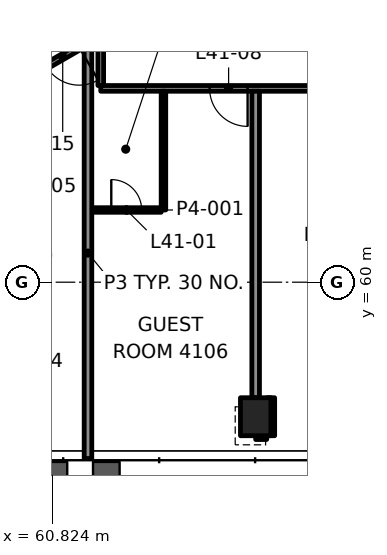
"""IFC4 building model, lengths in metres.
Left out: names, types, materials, properties, quantities, classifications, styles, units other than length and angle.
Written with IfcOpenShell. Run it as: python <this file> out.ifc"""

import sys

from ifc_helpers import new_model, si_unit, direction, frame, frame_2d, origin, origin_2d, place, context, subcontext, project, spatial, rectangle, hollow_rectangle, extrude, element, fill, save


model = new_model("IFC4")
c1 = context("Model", 3, precision=1e-05, world=origin(), true_north=direction((0.0, 1.0)))
c2 = subcontext(c1, "Body", "Model", "MODEL_VIEW")
j1 = project(units=[si_unit("LENGTHUNIT", "METRE"), si_unit("PLANEANGLEUNIT", "RADIAN")], contexts=[c1])
p1 = place(None, origin())
s1 = spatial("IfcSite", under=j1, at=p1, CompositionType="ELEMENT")
p2 = place(p1, origin())
s2 = spatial("IfcBuilding", under=s1, at=p2, CompositionType="ELEMENT")
p3 = place(p2, frame((0.0, 0.0, 179.2)))
s3 = spatial("IfcBuildingStorey", under=s2, at=p3, CompositionType="ELEMENT", Elevation=179.2)
p4 = place(p3, frame((66.176, 56.46, -0.0), z_axis=(0.0, 0.0, 1.0), x_axis=(1.0, 0.0, 0.0)))
e1 = element("IfcColumn", 1, at=p4, inside=s3, PredefinedType="COLUMN", context=c2, shape_type="SweptSolid", body=[
    extrude(hollow_rectangle(XDim=0.8, YDim=1.0, WallThickness=0.05, at=origin_2d()), origin(), (0.0, 0.0, 1.0), 3.9),
])
p5 = place(p3, frame((66.176, 55.96, 0.0), z_axis=(0.0, 0.0, 1.0), x_axis=(1.0, 0.0, 0.0)))
e2 = element("IfcWall", 2, at=p5, inside=s3, PredefinedType="PARTITIONING", context=c2, shape_type="SweptSolid", body=[
    extrude(rectangle(XDim=0.29, YDim=0.2, at=frame_2d((0.145, 0.0))), origin(), (0.0, 0.0, 1.0), 3.1),
])
p6 = place(p3, frame((61.864, 61.9, 0.0), z_axis=(0.0, 0.0, 1.0), x_axis=(1.0, 0.0, 0.0)))
e3 = element("IfcWall", 3, at=p6, inside=s3, PredefinedType="PARTITIONING", context=c2, shape_type="SweptSolid", body=[
    extrude(rectangle(XDim=1.825, YDim=0.12, at=frame_2d((0.913, 0.0))), origin(), (0.0, 0.0, 1.0), 3.1),
])
p7 = place(p6, frame((0.513, 0.0, 0.0)))
e4 = element("IfcOpeningElement", 4, at=p7, cuts=e3, PredefinedType="OPENING", context=c2, shape_type="SweptSolid", body=[
    extrude(rectangle(XDim=0.8, YDim=2.1, at=frame_2d((0.4, 1.05))), frame((0.0, 0.07, 0.0), z_axis=(0.0, -1.0, 0.0), x_axis=(1.0, 0.0, 0.0)), (0.0, 0.0, 1.0), 0.14),
])
p8 = place(p3, frame((87.9, 65.1, 0.0), z_axis=(0.0, 0.0, 1.0), x_axis=(-1.0, 0.0, 0.0)))
e5 = element("IfcWall", 5, at=p8, inside=s3, PredefinedType="PARTITIONING", context=c2, shape_type="SweptSolid", body=[
    extrude(rectangle(XDim=25.8, YDim=0.15, at=frame_2d((12.9, 0.0))), origin(), (0.0, 0.0, 1.0), 3.1),
])
p9 = place(p8, frame((2.264, 0.0, 0.0)))
e6 = element("IfcOpeningElement", 6, at=p9, cuts=e5, PredefinedType="OPENING", context=c2, shape_type="SweptSolid", body=[
    extrude(rectangle(XDim=1.0, YDim=2.1, at=frame_2d((0.5, 1.05))), frame((0.0, 0.085, 0.0), z_axis=(0.0, -1.0, 0.0), x_axis=(1.0, 0.0, 0.0)), (0.0, 0.0, 1.0), 0.17),
])
p10 = place(p8, frame((10.244, 0.0, 0.0)))
e7 = element("IfcOpeningElement", 7, at=p10, cuts=e5, PredefinedType="OPENING", context=c2, shape_type="SweptSolid", body=[
    extrude(rectangle(XDim=0.9, YDim=2.1, at=frame_2d((0.45, 1.05))), frame((0.0, 0.085, 0.0), z_axis=(0.0, -1.0, 0.0), x_axis=(1.0, 0.0, 0.0)), (0.0, 0.0, 1.0), 0.17),
])
p11 = place(p8, frame((18.135, 0.0, 0.0)))
e8 = element("IfcOpeningElement", 8, at=p11, cuts=e5, PredefinedType="OPENING", context=c2, shape_type="SweptSolid", body=[
    extrude(rectangle(XDim=1.0, YDim=2.1, at=frame_2d((0.5, 1.05))), frame((0.0, 0.085, 0.0), z_axis=(0.0, -1.0, 0.0), x_axis=(1.0, 0.0, 0.0)), (0.0, 0.0, 1.0), 0.17),
])
p12 = place(p8, frame((21.936, 0.0, 0.0)))
e9 = element("IfcOpeningElement", 9, at=p12, cuts=e5, PredefinedType="OPENING", context=c2, shape_type="SweptSolid", body=[
    extrude(rectangle(XDim=1.0, YDim=2.1, at=frame_2d((0.5, 1.05))), frame((0.0, 0.085, 0.0), z_axis=(0.0, -1.0, 0.0), x_axis=(1.0, 0.0, 0.0)), (0.0, 0.0, 1.0), 0.17),
])
p13 = place(p3, frame((62.1, 66.513, 0.0), z_axis=(0.0, 0.0, 1.0), x_axis=(-0.866025334814, -0.500000119461, 0.0)))
e10 = element("IfcWall", 10, at=p13, inside=s3, PredefinedType="PARTITIONING", context=c2, shape_type="SweptSolid", body=[
    extrude(rectangle(XDim=14.03, YDim=0.15, at=frame_2d((7.015, 0.0))), origin(), (0.0, 0.0, 1.0), 2.947),
])
p14 = place(p13, frame((0.656, 0.0, 0.0)))
e11 = element("IfcOpeningElement", 11, at=p14, cuts=e10, PredefinedType="OPENING", context=c2, shape_type="SweptSolid", body=[
    extrude(rectangle(XDim=1.0, YDim=2.1, at=frame_2d((0.5, 1.05))), frame((0.0, 0.085, 0.0), z_axis=(0.0, -1.0, 0.0), x_axis=(1.0, 0.0, 0.0)), (0.0, 0.0, 1.0), 0.17),
])
p15 = place(p13, frame((6.582, 0.0, 0.0)))
e12 = element("IfcOpeningElement", 12, at=p15, cuts=e10, PredefinedType="OPENING", context=c2, shape_type="SweptSolid", body=[
    extrude(rectangle(XDim=1.0, YDim=2.1, at=frame_2d((0.5, 1.05))), frame((0.0, 0.085, 0.0), z_axis=(0.0, -1.0, 0.0), x_axis=(1.0, 0.0, 0.0)), (0.0, 0.0, 1.0), 0.17),
])
p16 = place(p3, frame((49.05, 61.057, 0.0), z_axis=(0.0, 0.0, 1.0), x_axis=(0.866027379905, 0.499996577244, 0.0)))
e13 = element("IfcWall", 13, at=p16, inside=s3, PredefinedType="PARTITIONING", context=c2, shape_type="SweptSolid", body=[
    extrude(rectangle(XDim=14.982, YDim=0.15, at=frame_2d((7.491, 0.0))), origin(), (0.0, 0.0, 1.0), 3.1),
])
p17 = place(p16, frame((0.532, 0.0, 0.0)))
e14 = element("IfcOpeningElement", 14, at=p17, cuts=e13, PredefinedType="OPENING", context=c2, shape_type="SweptSolid", body=[
    extrude(rectangle(XDim=1.0, YDim=2.1, at=frame_2d((0.5, 1.05))), frame((0.0, 0.085, 0.0), z_axis=(0.0, -1.0, 0.0), x_axis=(1.0, 0.0, 0.0)), (0.0, 0.0, 1.0), 0.17),
])
p18 = place(p16, frame((8.725, 0.0, 0.0)))
e15 = element("IfcOpeningElement", 15, at=p18, cuts=e13, PredefinedType="OPENING", context=c2, shape_type="SweptSolid", body=[
    extrude(rectangle(XDim=1.0, YDim=2.1, at=frame_2d((0.5, 1.05))), frame((0.0, 0.085, 0.0), z_axis=(0.0, -1.0, 0.0), x_axis=(1.0, 0.0, 0.0)), (0.0, 0.0, 1.0), 0.17),
])
p19 = place(p16, frame((13.76, 0.0, 0.0)))
e16 = element("IfcOpeningElement", 16, at=p19, cuts=e13, PredefinedType="OPENING", context=c2, shape_type="SweptSolid", body=[
    extrude(rectangle(XDim=1.0, YDim=2.1, at=frame_2d((0.5, 1.05))), frame((0.0, 0.085, 0.0), z_axis=(0.0, -1.0, 0.0), x_axis=(1.0, 0.0, 0.0)), (0.0, 0.0, 1.0), 0.17),
])
p20 = place(p3, frame((66.576, 55.96, 0.0), z_axis=(0.0, 0.0, 1.0), x_axis=(0.0, 1.0, 0.0)))
e17 = element("IfcWall", 17, at=p20, inside=s3, PredefinedType="PARTITIONING", context=c2, shape_type="SweptSolid", body=[
    extrude(rectangle(XDim=1.0, YDim=0.2, at=frame_2d((0.5, 0.0))), origin(), (0.0, 0.0, 1.0), 3.022),
])
p21 = place(p3, frame((66.176, 56.96, 0.0), z_axis=(0.0, 0.0, 1.0), x_axis=(0.0, 1.0, 0.0)))
e18 = element("IfcWall", 18, at=p21, inside=s3, PredefinedType="PARTITIONING", context=c2, shape_type="SweptSolid", body=[
    extrude(rectangle(XDim=8.065, YDim=0.2, at=frame_2d((4.033, 0.0))), origin(), (0.0, 0.0, 1.0), 3.1),
])
p22 = place(p3, frame((63.75, 61.9, 0.0), z_axis=(0.0, 0.0, 1.0), x_axis=(0.0, 1.0, 0.0)))
e19 = element("IfcWall", 19, at=p22, inside=s3, PredefinedType="PARTITIONING", context=c2, shape_type="SweptSolid", body=[
    extrude(rectangle(XDim=3.125, YDim=0.12, at=frame_2d((1.562, 0.0))), origin(), (0.0, 0.0, 1.0), 3.1),
])
p23 = place(p3, frame((62.1, 65.175, 0.0), z_axis=(0.0, 0.0, 1.0), x_axis=(0.0, 1.0, 0.0)))
e20 = element("IfcWall", 20, at=p23, inside=s3, PredefinedType="PARTITIONING", context=c2, shape_type="SweptSolid", body=[
    extrude(rectangle(XDim=1.201, YDim=0.15, at=frame_2d((0.601, 0.0))), origin(), (0.0, 0.0, 1.0), 2.947),
])
p24 = place(p3, frame((61.764, 55.36, 0.0), z_axis=(0.0, 0.0, 1.0), x_axis=(0.0, 1.0, 0.0)))
e21 = element("IfcWall", 21, at=p24, inside=s3, PredefinedType="PARTITIONING", context=c2, shape_type="SweptSolid", body=[
    extrude(rectangle(XDim=10.813, YDim=0.2, at=frame_2d((5.406, 0.0))), origin(), (0.0, 0.0, 1.0), 2.947),
])
p25 = place(p7, origin())
e22 = element("IfcDoor", 22, at=p25, inside=s3, OperationType="SINGLE_SWING_RIGHT", PredefinedType="DOOR", context=c2, shape_type="SweptSolid", body=[
    extrude(rectangle(XDim=0.8, YDim=2.1, at=frame_2d((0.4, 1.05))), frame((0.0, 0.025, 0.0), z_axis=(0.0, -1.0, 0.0), x_axis=(1.0, 0.0, 0.0)), (0.0, 0.0, 1.0), 0.05),
])
fill(e4, e22)
p26 = place(p12, origin())
e23 = element("IfcDoor", 23, at=p26, inside=s3, OperationType="SINGLE_SWING_RIGHT", PredefinedType="DOOR", context=c2, shape_type="SweptSolid", body=[
    extrude(rectangle(XDim=1.0, YDim=2.1, at=frame_2d((0.5, 1.05))), frame((0.0, 0.025, 0.0), z_axis=(0.0, -1.0, 0.0), x_axis=(1.0, 0.0, 0.0)), (0.0, 0.0, 1.0), 0.05),
])
fill(e9, e23)
p27 = place(p14, origin())
e24 = element("IfcDoor", 24, at=p27, inside=s3, OperationType="SINGLE_SWING_RIGHT", PredefinedType="DOOR", context=c2, shape_type="SweptSolid", body=[
    extrude(rectangle(XDim=1.0, YDim=2.1, at=frame_2d((0.5, 1.05))), frame((0.0, 0.025, 0.0), z_axis=(0.0, -1.0, 0.0), x_axis=(1.0, 0.0, 0.0)), (0.0, 0.0, 1.0), 0.05),
])
fill(e11, e24)
save(model, sys.argv[1])
